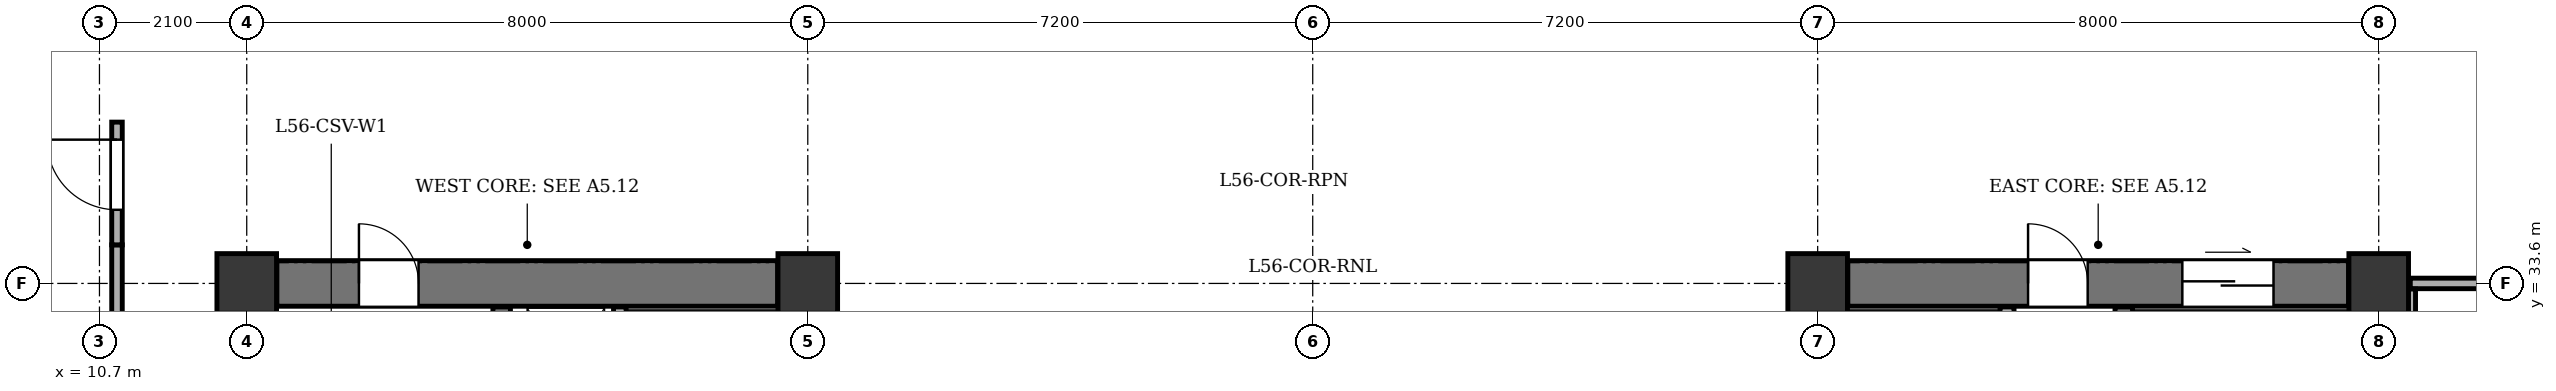
"""IFC4 building model, lengths in metres.
Left out: names, types, materials, properties, quantities, classifications, styles, units other than length and angle.
Written with IfcOpenShell. Run it as: python <this file> out.ifc"""

import sys

from ifc_helpers import new_model, si_unit, direction, frame, frame_2d, origin, origin_2d, place, context, subcontext, project, spatial, rectangle, extrude, element, fill, save


model = new_model("IFC4")
c1 = context("Model", 3, precision=1e-05, world=origin(), true_north=direction((0.0, 1.0)))
c2 = subcontext(c1, "Body", "Model", "MODEL_VIEW")
j1 = project(units=[si_unit("LENGTHUNIT", "METRE"), si_unit("PLANEANGLEUNIT", "RADIAN")], contexts=[c1])
p1 = place(None, origin())
s1 = spatial("IfcSite", under=j1, at=p1, CompositionType="ELEMENT")
p2 = place(p1, origin())
s2 = spatial("IfcBuilding", under=s1, at=p2, CompositionType="ELEMENT")
p3 = place(p2, frame((0.0, 0.0, 217.7)))
s3 = spatial("IfcBuildingStorey", under=s2, at=p3, CompositionType="ELEMENT", Elevation=217.7)
for number, where, z_axis, x_axis in (
    (1, (12.8, 33.6, 0.0), (0.0, 0.0, 1.0), (1.0, 0.0, 0.0)),
    (2, (20.8, 33.6, 0.0), (0.0, 0.0, 1.0), (1.0, 0.0, 0.0)),
    (3, (35.2, 33.6, 0.0), (0.0, 0.0, 1.0), (1.0, 0.0, 0.0)),
    (4, (43.2, 33.6, 0.0), (0.0, 0.0, 1.0), (1.0, 0.0, 0.0)),
):
    element("IfcColumn", number, at=place(p3, frame(where, z_axis=z_axis, x_axis=x_axis)), inside=s3, PredefinedType="COLUMN", context=c2, shape_type="SweptSolid", body=[
        extrude(rectangle(XDim=0.85, YDim=0.85, at=origin_2d()), origin(), (0.0, 0.0, 1.0), 3.4),
    ])
p4 = place(p3, frame((13.23, 33.6, 0.0), z_axis=(0.0, 0.0, 1.0), x_axis=(1.0, 0.0, 0.0)))
e5 = element("IfcWall", 5, at=p4, inside=s3, PredefinedType="SHEAR", context=c2, shape_type="SweptSolid", body=[
    extrude(rectangle(XDim=7.14, YDim=0.65, at=frame_2d((3.57, 0.0))), origin(), (0.0, 0.0, 1.0), 3.1),
])
p5 = place(p4, frame((1.17, 0.0, 0.0)))
e6 = element("IfcOpeningElement", 6, at=p5, cuts=e5, PredefinedType="OPENING", context=c2, shape_type="SweptSolid", body=[
    extrude(rectangle(XDim=0.85, YDim=2.02, at=frame_2d((0.425, 1.01))), frame((0.0, 0.335, 0.0), z_axis=(0.0, -1.0, 0.0), x_axis=(1.0, 0.0, 0.0)), (0.0, 0.0, 1.0), 0.67),
])
p6 = place(p3, frame((16.435, 21.135, 0.0), z_axis=(0.0, 0.0, 1.0), x_axis=(0.0, 1.0, 0.0)))
e7 = element("IfcWall", 7, at=p6, inside=s3, PredefinedType="SHEAR", context=c2, shape_type="SweptSolid", body=[
    extrude(rectangle(XDim=12.13, YDim=0.25, at=frame_2d((6.065, 0.0))), origin(), (0.0, 0.0, 1.0), 3.1),
])
p7 = place(p6, frame((0.515, 0.0, 0.0)))
e8 = element("IfcOpeningElement", 8, at=p7, cuts=e7, PredefinedType="OPENING", context=c2, shape_type="SweptSolid", body=[
    extrude(rectangle(XDim=1.2, YDim=2.15, at=frame_2d((0.6, 1.075))), frame((0.0, 0.135, 0.0), z_axis=(0.0, -1.0, 0.0), x_axis=(1.0, 0.0, 0.0)), (0.0, 0.0, 1.0), 0.27),
])
p8 = place(p6, frame((2.665, 0.0, 0.0)))
e9 = element("IfcOpeningElement", 9, at=p8, cuts=e7, PredefinedType="OPENING", context=c2, shape_type="SweptSolid", body=[
    extrude(rectangle(XDim=1.15, YDim=2.15, at=frame_2d((0.575, 1.075))), frame((0.0, 0.135, 0.0), z_axis=(0.0, -1.0, 0.0), x_axis=(1.0, 0.0, 0.0)), (0.0, 0.0, 1.0), 0.27),
])
p9 = place(p3, frame((18.12, 31.17, 0.0), z_axis=(0.0, 0.0, 1.0), x_axis=(0.0, 1.0, 0.0)))
e10 = element("IfcWall", 10, at=p9, inside=s3, PredefinedType="PARTITIONING", context=c2, shape_type="SweptSolid", body=[
    extrude(rectangle(XDim=2.095, YDim=0.18, at=frame_2d((1.047, 0.0))), origin(), (0.0, 0.0, 1.0), 3.1),
])
p10 = place(p3, frame((35.63, 33.6, 0.0), z_axis=(0.0, 0.0, 1.0), x_axis=(1.0, 0.0, 0.0)))
e11 = element("IfcWall", 11, at=p10, inside=s3, PredefinedType="SHEAR", context=c2, shape_type="SweptSolid", body=[
    extrude(rectangle(XDim=7.14, YDim=0.65, at=frame_2d((3.57, 0.0))), origin(), (0.0, 0.0, 1.0), 3.1),
])
p11 = place(p10, frame((4.77, 0.0, 0.0)))
e12 = element("IfcOpeningElement", 12, at=p11, cuts=e11, PredefinedType="OPENING", context=c2, shape_type="SweptSolid", body=[
    extrude(rectangle(XDim=1.3, YDim=2.15, at=frame_2d((0.65, 1.075))), frame((0.0, 0.335, 0.0), z_axis=(0.0, -1.0, 0.0), x_axis=(1.0, 0.0, 0.0)), (0.0, 0.0, 1.0), 0.67),
])
p12 = place(p10, frame((2.57, 0.0, 0.0)))
e13 = element("IfcOpeningElement", 13, at=p12, cuts=e11, PredefinedType="OPENING", context=c2, shape_type="SweptSolid", body=[
    extrude(rectangle(XDim=0.85, YDim=2.02, at=frame_2d((0.425, 1.01))), frame((0.0, 0.335, 0.0), z_axis=(0.0, -1.0, 0.0), x_axis=(1.0, 0.0, 0.0)), (0.0, 0.0, 1.0), 0.67),
])
p13 = place(p3, frame((39.565, 21.135, 0.0), z_axis=(0.0, 0.0, 1.0), x_axis=(0.0, 1.0, 0.0)))
e14 = element("IfcWall", 14, at=p13, inside=s3, PredefinedType="SHEAR", context=c2, shape_type="SweptSolid", body=[
    extrude(rectangle(XDim=12.13, YDim=0.25, at=frame_2d((6.065, 0.0))), origin(), (0.0, 0.0, 1.0), 3.1),
])
p14 = place(p13, frame((0.515, 0.0, 0.0)))
e15 = element("IfcOpeningElement", 15, at=p14, cuts=e14, PredefinedType="OPENING", context=c2, shape_type="SweptSolid", body=[
    extrude(rectangle(XDim=1.2, YDim=2.15, at=frame_2d((0.6, 1.075))), frame((0.0, 0.135, 0.0), z_axis=(0.0, -1.0, 0.0), x_axis=(1.0, 0.0, 0.0)), (0.0, 0.0, 1.0), 0.27),
])
p15 = place(p13, frame((2.665, 0.0, 0.0)))
e16 = element("IfcOpeningElement", 16, at=p15, cuts=e14, PredefinedType="OPENING", context=c2, shape_type="SweptSolid", body=[
    extrude(rectangle(XDim=1.15, YDim=2.15, at=frame_2d((0.575, 1.075))), frame((0.0, 0.135, 0.0), z_axis=(0.0, -1.0, 0.0), x_axis=(1.0, 0.0, 0.0)), (0.0, 0.0, 1.0), 0.27),
])
p16 = place(p3, frame((37.9, 25.27, 0.0), z_axis=(0.0, 0.0, 1.0), x_axis=(0.0, 1.0, 0.0)))
e17 = element("IfcWall", 17, at=p16, inside=s3, PredefinedType="SOLIDWALL", context=c2, shape_type="SweptSolid", body=[
    extrude(rectangle(XDim=7.995, YDim=0.2, at=frame_2d((3.998, 0.0))), origin(), (0.0, 0.0, 1.0), 3.1),
])
p17 = place(p3, frame((10.95, 20.25, 0.0), z_axis=(0.0, 0.0, 1.0), x_axis=(0.0, 1.0, 0.0)))
e18 = element("IfcWall", 18, at=p17, inside=s3, PredefinedType="PARTITIONING", context=c2, shape_type="SweptSolid", body=[
    extrude(rectangle(XDim=13.9, YDim=0.15, at=frame_2d((6.95, 0.0))), origin(), (0.0, 0.0, 1.0), 3.1),
])
p18 = place(p3, frame((10.95, 34.15, 0.0), z_axis=(0.0, 0.0, 1.0), x_axis=(0.0, 1.0, 0.0)))
e19 = element("IfcWall", 19, at=p18, inside=s3, PredefinedType="PARTITIONING", context=c2, shape_type="SweptSolid", body=[
    extrude(rectangle(XDim=1.75, YDim=0.15, at=frame_2d((0.875, 0.0))), origin(), (0.0, 0.0, 1.0), 3.1),
])
p19 = place(p18, frame((0.5, 0.0, 0.0)))
e20 = element("IfcOpeningElement", 20, at=p19, cuts=e19, PredefinedType="OPENING", context=c2, shape_type="SweptSolid", body=[
    extrude(rectangle(XDim=1.0, YDim=2.1, at=frame_2d((0.5, 1.05))), frame((0.0, 0.085, 0.0), z_axis=(0.0, -1.0, 0.0), x_axis=(1.0, 0.0, 0.0)), (0.0, 0.0, 1.0), 0.17),
])
p20 = place(p3, frame((43.65, 33.6, 0.0), z_axis=(0.0, 0.0, 1.0), x_axis=(1.0, 0.0, 0.0)))
e21 = element("IfcWall", 21, at=p20, inside=s3, PredefinedType="PARTITIONING", context=c2, shape_type="SweptSolid", body=[
    extrude(rectangle(XDim=5.305, YDim=0.15, at=frame_2d((2.653, 0.0))), origin(), (0.0, 0.0, 1.0), 2.535),
])
p21 = place(p3, frame((43.65, 20.25, 0.0), z_axis=(0.0, 0.0, 1.0), x_axis=(0.0, 1.0, 0.0)))
e22 = element("IfcWall", 22, at=p21, inside=s3, PredefinedType="PARTITIONING", context=c2, shape_type="SweptSolid", body=[
    extrude(rectangle(XDim=13.27, YDim=0.15, at=frame_2d((6.635, 0.0))), origin(), (0.0, 0.0, 1.0), 3.1),
])
p22 = place(p5, origin())
e23 = element("IfcDoor", 23, at=p22, inside=s3, OperationType="SINGLE_SWING_LEFT", PredefinedType="DOOR", context=c2, shape_type="SweptSolid", body=[
    extrude(rectangle(XDim=0.85, YDim=2.02, at=frame_2d((0.425, 1.01))), frame((0.0, 0.025, 0.0), z_axis=(0.0, -1.0, 0.0), x_axis=(1.0, 0.0, 0.0)), (0.0, 0.0, 1.0), 0.05),
])
fill(e6, e23)
p23 = place(p11, origin())
e24 = element("IfcDoor", 24, at=p23, inside=s3, OperationType="DOUBLE_DOOR_SLIDING", PredefinedType="DOOR", context=c2, shape_type="SweptSolid", body=[
    extrude(rectangle(XDim=1.3, YDim=2.15, at=frame_2d((0.65, 1.075))), frame((0.0, 0.025, 0.0), z_axis=(0.0, -1.0, 0.0), x_axis=(1.0, 0.0, 0.0)), (0.0, 0.0, 1.0), 0.05),
])
fill(e12, e24)
p24 = place(p12, origin())
e25 = element("IfcDoor", 25, at=p24, inside=s3, OperationType="SINGLE_SWING_LEFT", PredefinedType="DOOR", context=c2, shape_type="SweptSolid", body=[
    extrude(rectangle(XDim=0.85, YDim=2.02, at=frame_2d((0.425, 1.01))), frame((0.0, 0.025, 0.0), z_axis=(0.0, -1.0, 0.0), x_axis=(1.0, 0.0, 0.0)), (0.0, 0.0, 1.0), 0.05),
])
fill(e13, e25)
p25 = place(p19, origin())
e26 = element("IfcDoor", 26, at=p25, inside=s3, OperationType="SINGLE_SWING_RIGHT", PredefinedType="DOOR", context=c2, shape_type="SweptSolid", body=[
    extrude(rectangle(XDim=1.0, YDim=2.1, at=frame_2d((0.5, 1.05))), frame((0.0, 0.025, 0.0), z_axis=(0.0, -1.0, 0.0), x_axis=(1.0, 0.0, 0.0)), (0.0, 0.0, 1.0), 0.05),
])
fill(e20, e26)
save(model, sys.argv[1])
